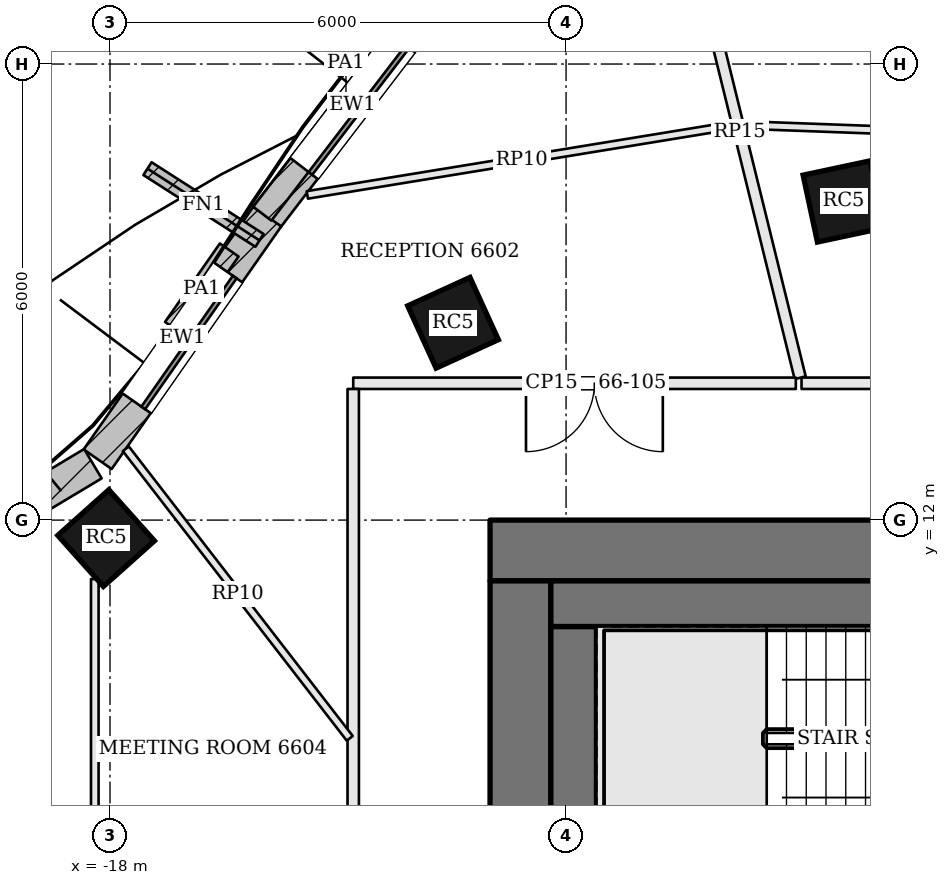
"""IFC4 building model, lengths in metres.
Left out: names, types, materials, properties, quantities, classifications, styles, units other than length and angle.
Written with IfcOpenShell. Run it as: python <this file> out.ifc"""

import sys

from ifc_helpers import new_model, si_unit, direction, frame, frame_2d, origin, origin_2d, place, context, subcontext, project, spatial, rectangle, extrude, element, fill, save


model = new_model("IFC4")
c1 = context("Model", 3, precision=1e-05, world=origin(), true_north=direction((0.0, 1.0)))
c2 = subcontext(c1, "Body", "Model", "MODEL_VIEW")
j1 = project(units=[si_unit("LENGTHUNIT", "METRE"), si_unit("PLANEANGLEUNIT", "RADIAN")], contexts=[c1])
p1 = place(None, origin())
s1 = spatial("IfcSite", under=j1, at=p1, CompositionType="ELEMENT")
p2 = place(p1, origin())
s2 = spatial("IfcBuilding", under=s1, at=p2, CompositionType="ELEMENT")
p3 = place(p2, frame((0.0, 0.0, 268.8)))
s3 = spatial("IfcBuildingStorey", under=s2, at=p3, CompositionType="ELEMENT", Elevation=268.8)
p4 = place(p3, frame((-13.0, 11.6, 0.0), z_axis=(0.0, 0.0, 1.0), x_axis=(1.0, 0.0, 0.0)))
e1 = element("IfcWall", 1, at=p4, inside=s3, PredefinedType="SHEAR", context=c2, shape_type="SweptSolid", body=[
    extrude(rectangle(XDim=26.0, YDim=0.8, at=frame_2d((13.0, 0.0))), origin(), (0.0, 0.0, 1.0), 3.9),
])
p5 = place(p4, frame((8.825, 0.0, 0.0)))
e2 = element("IfcOpeningElement", 2, at=p5, cuts=e1, PredefinedType="OPENING", context=c2, shape_type="SweptSolid", body=[
    extrude(rectangle(XDim=1.0, YDim=2.1, at=frame_2d((0.5, 1.05))), frame((0.0, 0.41, 0.0), z_axis=(0.0, -1.0, 0.0), x_axis=(1.0, 0.0, 0.0)), (0.0, 0.0, 1.0), 0.82),
])
p6 = place(p4, frame((11.825, 0.0, 0.0)))
e3 = element("IfcOpeningElement", 3, at=p6, cuts=e1, PredefinedType="OPENING", context=c2, shape_type="SweptSolid", body=[
    extrude(rectangle(XDim=0.7, YDim=2.1, at=frame_2d((0.35, 1.05))), frame((0.0, 0.41, 0.0), z_axis=(0.0, -1.0, 0.0), x_axis=(1.0, 0.0, 0.0)), (0.0, 0.0, 1.0), 0.82),
])
p7 = place(p4, frame((14.275, 0.0, 0.0)))
e4 = element("IfcOpeningElement", 4, at=p7, cuts=e1, PredefinedType="OPENING", context=c2, shape_type="SweptSolid", body=[
    extrude(rectangle(XDim=0.7, YDim=2.1, at=frame_2d((0.35, 1.05))), frame((0.0, 0.41, 0.0), z_axis=(0.0, -1.0, 0.0), x_axis=(1.0, 0.0, 0.0)), (0.0, 0.0, 1.0), 0.82),
])
p8 = place(p4, frame((16.175, 0.0, 0.0)))
e5 = element("IfcOpeningElement", 5, at=p8, cuts=e1, PredefinedType="OPENING", context=c2, shape_type="SweptSolid", body=[
    extrude(rectangle(XDim=1.0, YDim=2.1, at=frame_2d((0.5, 1.05))), frame((0.0, 0.41, 0.0), z_axis=(0.0, -1.0, 0.0), x_axis=(1.0, 0.0, 0.0)), (0.0, 0.0, 1.0), 0.82),
])
p9 = place(p3, frame((-12.6, -2.2, 0.0), z_axis=(0.0, 0.0, 1.0), x_axis=(0.0, 1.0, 0.0)))
e6 = element("IfcWall", 6, at=p9, inside=s3, PredefinedType="SHEAR", context=c2, shape_type="SweptSolid", body=[
    extrude(rectangle(XDim=13.4, YDim=0.8, at=frame_2d((6.7, 0.0))), origin(), (0.0, 0.0, 1.0), 3.9),
])
p10 = place(p9, frame((4.2, 0.0, 0.0)))
e7 = element("IfcOpeningElement", 7, at=p10, cuts=e6, PredefinedType="OPENING", context=c2, shape_type="SweptSolid", body=[
    extrude(rectangle(XDim=1.8, YDim=2.1, at=frame_2d((0.9, 1.05))), frame((0.0, 0.41, 0.0), z_axis=(0.0, -1.0, 0.0), x_axis=(1.0, 0.0, 0.0)), (0.0, 0.0, 1.0), 0.82),
])
for number, where, z_axis, x_axis in (
    (8, (-8.347, 16.192, -0.7), (0.0, 0.0, 1.0), (-0.978, -0.209, 0.0)),
    (9, (-13.487, 14.596, -0.7), (0.0, 0.0, 1.0), (-0.91, -0.415, 0.0)),
    (10, (-18.051, 11.763, -0.7), (0.0, 0.0, 1.0), (-0.746, -0.666, 0.0)),
):
    element("IfcColumn", number, at=place(p3, frame(where, z_axis=z_axis, x_axis=x_axis)), inside=s3, PredefinedType="COLUMN", context=c2, shape_type="SweptSolid", body=[
        extrude(rectangle(XDim=0.9, YDim=0.9, at=origin_2d()), origin(), (0.0, 0.0, 1.0), 4.6),
    ])
p11 = place(p3, frame((-13.679, 18.932, 0.0), z_axis=(0.0, 0.0, 1.0), x_axis=(-0.608206493093, -0.793778849403, 0.0)))
e11 = element("IfcWall", 11, at=p11, inside=s3, PredefinedType="SOLIDWALL", context=c2, shape_type="SweptSolid", body=[
    extrude(rectangle(XDim=3.713, YDim=0.45, at=frame_2d((1.856, 0.0))), origin(), (0.0, 0.0, 1.0), 3.7),
])
p12 = place(p11, frame((0.806, 0.0, 0.9)))
e12 = element("IfcOpeningElement", 12, at=p12, cuts=e11, PredefinedType="OPENING", context=c2, shape_type="SweptSolid", body=[
    extrude(rectangle(XDim=2.1, YDim=2.3, at=frame_2d((1.05, 1.15))), frame((0.0, 0.235, 0.0), z_axis=(0.0, -1.0, 0.0), x_axis=(1.0, 0.0, 0.0)), (0.0, 0.0, 1.0), 0.47),
])
p13 = place(p3, frame((-15.931, 15.993, 0.0), z_axis=(0.0, 0.0, 1.0), x_axis=(-0.572923675708, -0.819608724828, 0.0)))
e13 = element("IfcWall", 13, at=p13, inside=s3, PredefinedType="SOLIDWALL", context=c2, shape_type="SweptSolid", body=[
    extrude(rectangle(XDim=3.895, YDim=0.45, at=frame_2d((1.947, 0.0))), origin(), (0.0, 0.0, 1.0), 3.7),
])
p14 = place(p13, frame((0.897, 0.0, 0.9)))
e14 = element("IfcOpeningElement", 14, at=p14, cuts=e13, PredefinedType="OPENING", context=c2, shape_type="SweptSolid", body=[
    extrude(rectangle(XDim=2.1, YDim=2.3, at=frame_2d((1.05, 1.15))), frame((0.0, 0.235, 0.0), z_axis=(0.0, -1.0, 0.0), x_axis=(1.0, 0.0, 0.0)), (0.0, 0.0, 1.0), 0.47),
])
p15 = place(p3, frame((-18.225, 12.742, 0.0), z_axis=(0.0, 0.0, 1.0), x_axis=(-0.857965073766, -0.513708022322, 0.0)))
e15 = element("IfcWall", 15, at=p15, inside=s3, PredefinedType="SOLIDWALL", context=c2, shape_type="SweptSolid", body=[
    extrude(rectangle(XDim=3.83, YDim=0.45, at=frame_2d((1.915, 0.0))), origin(), (0.0, 0.0, 1.0), 3.7),
])
p16 = place(p15, frame((0.865, 0.0, 0.9)))
e16 = element("IfcOpeningElement", 16, at=p16, cuts=e15, PredefinedType="OPENING", context=c2, shape_type="SweptSolid", body=[
    extrude(rectangle(XDim=2.1, YDim=2.3, at=frame_2d((1.05, 1.15))), frame((0.0, 0.235, 0.0), z_axis=(0.0, -1.0, 0.0), x_axis=(1.0, 0.0, 0.0)), (0.0, 0.0, 1.0), 0.47),
])
p17 = place(p3, frame((-16.033, 15.68, 0.0), z_axis=(0.0, 0.0, 1.0), x_axis=(-0.842083858075, 0.539346619503, 0.0)))
e17 = element("IfcWall", 17, at=p17, inside=s3, PredefinedType="SOLIDWALL", context=c2, shape_type="SweptSolid", body=[
    extrude(rectangle(XDim=1.75, YDim=0.2, at=frame_2d((0.875, 0.0))), origin(), (0.0, 0.0, 1.0), 3.7),
])
p18 = place(p3, frame((-13.795, 18.904, 3.9), z_axis=(0.0, 0.0, 1.0), x_axis=(-0.608203510632, -0.793781134605, 0.0)))
e18 = element("IfcWall", 18, at=p18, inside=s3, PredefinedType="PARAPET", context=c2, shape_type="SweptSolid", body=[
    extrude(rectangle(XDim=3.619, YDim=0.3, at=frame_2d((1.81, 0.0))), origin(), (0.0, 0.0, 1.0), 1.1),
])
p19 = place(p3, frame((-16.431, 15.553, 3.9), z_axis=(0.0, 0.0, 1.0), x_axis=(-0.572902892741, -0.819623252165, 0.0)))
e19 = element("IfcWall", 19, at=p19, inside=s3, PredefinedType="PARAPET", context=c2, shape_type="SweptSolid", body=[
    extrude(rectangle(XDim=1.26, YDim=0.3, at=frame_2d((0.63, 0.0))), origin(), (0.0, 0.0, 1.0), 1.1),
])
p20 = place(p3, frame((-11.9, 7.65, 0.0), z_axis=(0.0, 0.0, 1.0), x_axis=(0.0, 1.0, 0.0)))
e20 = element("IfcWall", 20, at=p20, inside=s3, PredefinedType="SOLIDWALL", context=c2, shape_type="SweptSolid", body=[
    extrude(rectangle(XDim=2.95, YDim=0.6, at=frame_2d((1.475, 0.0))), origin(), (0.0, 0.0, 1.0), 3.7),
])
p21 = place(p3, frame((-12.2, 10.9, 0.0), z_axis=(0.0, 0.0, 1.0), x_axis=(1.0, 0.0, 0.0)))
e21 = element("IfcWall", 21, at=p21, inside=s3, PredefinedType="SOLIDWALL", context=c2, shape_type="SweptSolid", body=[
    extrude(rectangle(XDim=7.1, YDim=0.6, at=frame_2d((3.55, 0.0))), origin(), (0.0, 0.0, 1.0), 3.7),
])
p22 = place(p3, frame((14.725, 13.8, 0.0), z_axis=(0.0, 0.0, 1.0), x_axis=(-1.0, 0.0, 0.0)))
e22 = element("IfcWall", 22, at=p22, inside=s3, PredefinedType="PARTITIONING", context=c2, shape_type="SweptSolid", body=[
    extrude(rectangle(XDim=23.627, YDim=0.15, at=frame_2d((11.813, 0.0))), origin(), (0.0, 0.0, 1.0), 3.198),
])
p23 = place(p22, frame((3.2, 0.0, 0.0)))
e23 = element("IfcOpeningElement", 23, at=p23, cuts=e22, PredefinedType="OPENING", context=c2, shape_type="SweptSolid", body=[
    extrude(rectangle(XDim=1.0, YDim=2.4, at=frame_2d((0.5, 1.2))), frame((0.0, 0.085, 0.0), z_axis=(0.0, -1.0, 0.0), x_axis=(1.0, 0.0, 0.0)), (0.0, 0.0, 1.0), 0.17),
])
p24 = place(p22, frame((5.414, 0.0, 0.0)))
e24 = element("IfcOpeningElement", 24, at=p24, cuts=e22, PredefinedType="OPENING", context=c2, shape_type="SweptSolid", body=[
    extrude(rectangle(XDim=1.0, YDim=2.4, at=frame_2d((0.5, 1.2))), frame((0.0, 0.085, 0.0), z_axis=(0.0, -1.0, 0.0), x_axis=(1.0, 0.0, 0.0)), (0.0, 0.0, 1.0), 0.17),
])
p25 = place(p22, frame((11.221, 0.0, 0.0)))
e25 = element("IfcOpeningElement", 25, at=p25, cuts=e22, PredefinedType="OPENING", context=c2, shape_type="SweptSolid", body=[
    extrude(rectangle(XDim=1.0, YDim=2.4, at=frame_2d((0.5, 1.2))), frame((0.0, 0.085, 0.0), z_axis=(0.0, -1.0, 0.0), x_axis=(1.0, 0.0, 0.0)), (0.0, 0.0, 1.0), 0.17),
])
p26 = place(p22, frame((0.25, 0.0, 0.0)))
e26 = element("IfcOpeningElement", 26, at=p26, cuts=e22, PredefinedType="OPENING", context=c2, shape_type="SweptSolid", body=[
    extrude(rectangle(XDim=0.9, YDim=2.1, at=frame_2d((0.45, 1.05))), frame((0.0, 0.085, 0.0), z_axis=(0.0, -1.0, 0.0), x_axis=(1.0, 0.0, 0.0)), (0.0, 0.0, 1.0), 0.17),
])
p27 = place(p22, frame((15.65, 0.0, 0.0)))
e27 = element("IfcOpeningElement", 27, at=p27, cuts=e22, PredefinedType="OPENING", context=c2, shape_type="SweptSolid", body=[
    extrude(rectangle(XDim=0.9, YDim=2.1, at=frame_2d((0.45, 1.05))), frame((0.0, 0.085, 0.0), z_axis=(0.0, -1.0, 0.0), x_axis=(1.0, 0.0, 0.0)), (0.0, 0.0, 1.0), 0.17),
])
p28 = place(p22, frame((20.05, 0.0, 0.0)))
e28 = element("IfcOpeningElement", 28, at=p28, cuts=e22, PredefinedType="OPENING", context=c2, shape_type="SweptSolid", body=[
    extrude(rectangle(XDim=1.0, YDim=2.1, at=frame_2d((0.5, 1.05))), frame((0.0, 0.085, 0.0), z_axis=(0.0, -1.0, 0.0), x_axis=(1.0, 0.0, 0.0)), (0.0, 0.0, 1.0), 0.17),
])
p29 = place(p3, frame((-10.511, 20.331, 0.0), z_axis=(0.0, 0.0, 1.0), x_axis=(0.239226174538, -0.970963870294, 0.0)))
e29 = element("IfcWall", 29, at=p29, inside=s3, PredefinedType="PARTITIONING", context=c2, shape_type="SweptSolid", body=[
    extrude(rectangle(XDim=6.651, YDim=0.15, at=frame_2d((3.325, 0.0))), origin(), (0.0, 0.0, 1.0), 3.184),
])
p30 = place(p3, frame((-8.977, 13.8, 0.0), z_axis=(0.0, 0.0, 1.0), x_axis=(-1.0, 0.0, 0.0)))
e30 = element("IfcWall", 30, at=p30, inside=s3, PredefinedType="PARTITIONING", context=c2, shape_type="SweptSolid", body=[
    extrude(rectangle(XDim=5.823, YDim=0.15, at=frame_2d((2.912, 0.0))), origin(), (0.0, 0.0, 1.0), 3.198),
])
p31 = place(p30, frame((1.75, 0.0, 0.0)))
e31 = element("IfcOpeningElement", 31, at=p31, cuts=e30, PredefinedType="OPENING", context=c2, shape_type="SweptSolid", body=[
    extrude(rectangle(XDim=1.8, YDim=2.1, at=frame_2d((0.9, 1.05))), frame((0.0, 0.085, 0.0), z_axis=(0.0, -1.0, 0.0), x_axis=(1.0, 0.0, 0.0)), (0.0, 0.0, 1.0), 0.17),
])
p32 = place(p3, frame((-14.8, 13.725, 0.0), z_axis=(0.0, 0.0, 1.0), x_axis=(0.0, -1.0, 0.0)))
e32 = element("IfcWall", 32, at=p32, inside=s3, PredefinedType="PARTITIONING", context=c2, shape_type="SweptSolid", body=[
    extrude(rectangle(XDim=18.525, YDim=0.15, at=frame_2d((9.263, 0.0))), origin(), (0.0, 0.0, 1.0), 3.198),
])
p33 = place(p32, frame((5.87, 0.0, 0.0)))
e33 = element("IfcOpeningElement", 33, at=p33, cuts=e32, PredefinedType="OPENING", context=c2, shape_type="SweptSolid", body=[
    extrude(rectangle(XDim=1.0, YDim=2.4, at=frame_2d((0.5, 1.2))), frame((0.0, 0.085, 0.0), z_axis=(0.0, -1.0, 0.0), x_axis=(1.0, 0.0, 0.0)), (0.0, 0.0, 1.0), 0.17),
])
p34 = place(p32, frame((10.328, 0.0, 0.0)))
e34 = element("IfcOpeningElement", 34, at=p34, cuts=e32, PredefinedType="OPENING", context=c2, shape_type="SweptSolid", body=[
    extrude(rectangle(XDim=1.0, YDim=2.4, at=frame_2d((0.5, 1.2))), frame((0.0, 0.085, 0.0), z_axis=(0.0, -1.0, 0.0), x_axis=(1.0, 0.0, 0.0)), (0.0, 0.0, 1.0), 0.17),
])
p35 = place(p32, frame((15.45, 0.0, 0.0)))
e35 = element("IfcOpeningElement", 35, at=p35, cuts=e32, PredefinedType="OPENING", context=c2, shape_type="SweptSolid", body=[
    extrude(rectangle(XDim=1.0, YDim=2.1, at=frame_2d((0.5, 1.05))), frame((0.0, 0.085, 0.0), z_axis=(0.0, -1.0, 0.0), x_axis=(1.0, 0.0, 0.0)), (0.0, 0.0, 1.0), 0.17),
])
p36 = place(p3, frame((-9.719, 17.2, 0.0), z_axis=(0.0, 0.0, 1.0), x_axis=(0.999327414194, -0.036670413681, 0.0)))
e36 = element("IfcWall", 36, at=p36, inside=s3, PredefinedType="PARTITIONING", context=c2, shape_type="SweptSolid", body=[
    extrude(rectangle(XDim=6.245, YDim=0.1, at=frame_2d((3.123, 0.0))), origin(), (0.0, 0.0, 1.0), 3.184),
])
p37 = place(p36, frame((1.95, 0.0, 0.0)))
e37 = element("IfcOpeningElement", 37, at=p37, cuts=e36, PredefinedType="OPENING", context=c2, shape_type="SweptSolid", body=[
    extrude(rectangle(XDim=1.0, YDim=2.1, at=frame_2d((0.5, 1.05))), frame((0.0, 0.06, 0.0), z_axis=(0.0, -1.0, 0.0), x_axis=(1.0, 0.0, 0.0)), (0.0, 0.0, 1.0), 0.12),
])
p38 = place(p3, frame((-18.2, -8.193, 0.0), z_axis=(0.0, 0.0, 1.0), x_axis=(0.0, 1.0, 0.0)))
e38 = element("IfcWall", 38, at=p38, inside=s3, PredefinedType="PARTITIONING", context=c2, shape_type="SweptSolid", body=[
    extrude(rectangle(XDim=19.417, YDim=0.1, at=frame_2d((9.708, 0.0))), origin(), (0.0, 0.0, 1.0), 3.184),
])
p39 = place(p38, frame((2.92, 0.0, 0.0)))
e39 = element("IfcOpeningElement", 39, at=p39, cuts=e38, PredefinedType="OPENING", context=c2, shape_type="SweptSolid", body=[
    extrude(rectangle(XDim=0.9, YDim=2.1, at=frame_2d((0.45, 1.05))), frame((0.0, 0.06, 0.0), z_axis=(0.0, -1.0, 0.0), x_axis=(1.0, 0.0, 0.0)), (0.0, 0.0, 1.0), 0.12),
])
p40 = place(p38, frame((9.25, 0.0, 0.0)))
e40 = element("IfcOpeningElement", 40, at=p40, cuts=e38, PredefinedType="OPENING", context=c2, shape_type="SweptSolid", body=[
    extrude(rectangle(XDim=1.0, YDim=2.4, at=frame_2d((0.5, 1.2))), frame((0.0, 0.06, 0.0), z_axis=(0.0, -1.0, 0.0), x_axis=(1.0, 0.0, 0.0)), (0.0, 0.0, 1.0), 0.12),
])
p41 = place(p3, frame((-15.404, 16.278, 0.0), z_axis=(0.0, 0.0, 1.0), x_axis=(0.986915001918, 0.161241368728, 0.0)))
e41 = element("IfcWall", 41, at=p41, inside=s3, PredefinedType="PARTITIONING", context=c2, shape_type="SweptSolid", body=[
    extrude(rectangle(XDim=5.719, YDim=0.1, at=frame_2d((2.859, 0.0))), origin(), (0.0, 0.0, 1.0), 3.184),
])
p42 = place(p3, frame((-14.846, 9.129, 0.0), z_axis=(0.0, 0.0, 1.0), x_axis=(-0.611737488733, 0.791060835132, 0.0)))
e42 = element("IfcWall", 42, at=p42, inside=s3, PredefinedType="PARTITIONING", context=c2, shape_type="SweptSolid", body=[
    extrude(rectangle(XDim=4.815, YDim=0.1, at=frame_2d((2.408, 0.0))), origin(), (0.0, 0.0, 1.0), 3.184),
])
p43 = place(p12, origin())
e43 = element("IfcWindow", 43, at=p43, inside=s3, PartitioningType="SINGLE_PANEL", PredefinedType="WINDOW", context=c2, shape_type="SweptSolid", body=[
    extrude(rectangle(XDim=2.1, YDim=2.3, at=frame_2d((1.05, 1.15))), frame((0.0, 0.135, 0.0), z_axis=(0.0, -1.0, 0.0), x_axis=(1.0, 0.0, 0.0)), (0.0, 0.0, 1.0), 0.06),
])
fill(e12, e43)
p44 = place(p14, origin())
e44 = element("IfcWindow", 44, at=p44, inside=s3, PartitioningType="SINGLE_PANEL", PredefinedType="WINDOW", context=c2, shape_type="SweptSolid", body=[
    extrude(rectangle(XDim=2.1, YDim=2.3, at=frame_2d((1.05, 1.15))), frame((0.0, 0.135, 0.0), z_axis=(0.0, -1.0, 0.0), x_axis=(1.0, 0.0, 0.0)), (0.0, 0.0, 1.0), 0.06),
])
fill(e14, e44)
p45 = place(p31, origin())
e45 = element("IfcDoor", 45, at=p45, inside=s3, OperationType="DOUBLE_DOOR_SINGLE_SWING", PredefinedType="DOOR", context=c2, shape_type="SweptSolid", body=[
    extrude(rectangle(XDim=1.8, YDim=2.1, at=frame_2d((0.9, 1.05))), frame((0.0, 0.025, 0.0), z_axis=(0.0, -1.0, 0.0), x_axis=(1.0, 0.0, 0.0)), (0.0, 0.0, 1.0), 0.05),
])
fill(e31, e45)
save(model, sys.argv[1])
